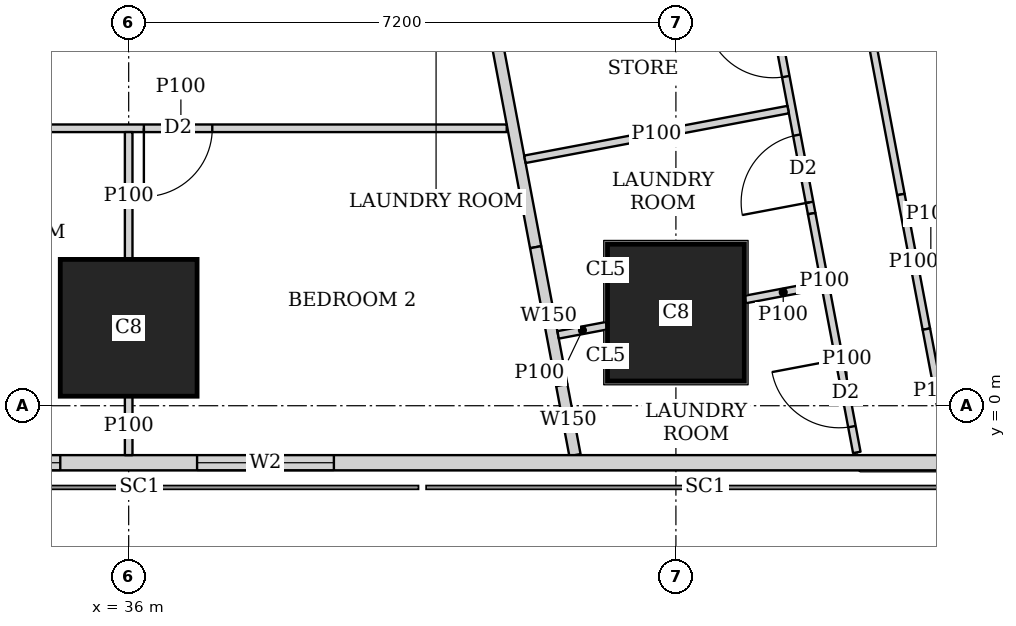
"""IFC4 building model, lengths in metres.
Left out: names, types, materials, properties, quantities, classifications, styles, units other than length and angle.
Written with IfcOpenShell. Run it as: python <this file> out.ifc"""

import sys

from ifc_helpers import new_model, si_unit, direction, frame, frame_2d, origin, origin_2d, place, context, subcontext, project, spatial, rectangle, extrude, element, fill, save


model = new_model("IFC4")
c1 = context("Model", 3, precision=1e-05, world=origin(), true_north=direction((0.0, 1.0)))
c2 = subcontext(c1, "Body", "Model", "MODEL_VIEW")
j1 = project(units=[si_unit("LENGTHUNIT", "METRE"), si_unit("PLANEANGLEUNIT", "RADIAN")], contexts=[c1])
p1 = place(None, origin())
s1 = spatial("IfcSite", under=j1, at=p1, CompositionType="ELEMENT")
p2 = place(p1, origin())
s2 = spatial("IfcBuilding", under=s1, at=p2, CompositionType="ELEMENT")
p3 = place(p2, frame((0.0, 0.0, 180.8)))
s3 = spatial("IfcBuildingStorey", under=s2, at=p3, CompositionType="ELEMENT", Elevation=180.8)
for number, where, z_axis, x_axis in (
    (1, (36.0, 1.025, 0.0), (0.0, 0.0, 1.0), (1.0, 0.0, 0.0)),
    (2, (43.2, 1.225, 0.0), (0.0, 0.0, 1.0), (1.0, 0.0, 0.0)),
):
    element("IfcColumn", number, at=place(p3, frame(where, z_axis=z_axis, x_axis=x_axis)), inside=s3, PredefinedType="COLUMN", context=c2, shape_type="SweptSolid", body=[
        extrude(rectangle(XDim=1.8, YDim=1.8, at=origin_2d()), origin(), (0.0, 0.0, 1.0), 3.75),
    ])
p4 = place(p3, frame((2.163, -0.75, 0.0), z_axis=(0.0, 0.0, 1.0), x_axis=(1.0, 0.0, 0.0)))
e3 = element("IfcWall", 3, at=p4, inside=s3, PredefinedType="SOLIDWALL", context=c2, shape_type="SweptSolid", body=[
    extrude(rectangle(XDim=45.628, YDim=0.2, at=frame_2d((22.814, 0.0))), origin(), (0.0, 0.0, 1.0), 3.5),
])
p5 = place(p4, frame((9.537, 0.0, 0.9)))
e4 = element("IfcOpeningElement", 4, at=p5, cuts=e3, PredefinedType="OPENING", context=c2, shape_type="SweptSolid", body=[
    extrude(rectangle(XDim=1.8, YDim=1.5, at=frame_2d((0.9, 0.75))), frame((0.0, 0.11, 0.0), z_axis=(0.0, -1.0, 0.0), x_axis=(1.0, 0.0, 0.0)), (0.0, 0.0, 1.0), 0.22),
])
p6 = place(p4, frame((13.137, 0.0, 0.9)))
e5 = element("IfcOpeningElement", 5, at=p6, cuts=e3, PredefinedType="OPENING", context=c2, shape_type="SweptSolid", body=[
    extrude(rectangle(XDim=1.8, YDim=1.5, at=frame_2d((0.9, 0.75))), frame((0.0, 0.11, 0.0), z_axis=(0.0, -1.0, 0.0), x_axis=(1.0, 0.0, 0.0)), (0.0, 0.0, 1.0), 0.22),
])
p7 = place(p4, frame((16.737, 0.0, 0.9)))
e6 = element("IfcOpeningElement", 6, at=p7, cuts=e3, PredefinedType="OPENING", context=c2, shape_type="SweptSolid", body=[
    extrude(rectangle(XDim=1.8, YDim=1.5, at=frame_2d((0.9, 0.75))), frame((0.0, 0.11, 0.0), z_axis=(0.0, -1.0, 0.0), x_axis=(1.0, 0.0, 0.0)), (0.0, 0.0, 1.0), 0.22),
])
p8 = place(p4, frame((20.337, 0.0, 0.9)))
e7 = element("IfcOpeningElement", 7, at=p8, cuts=e3, PredefinedType="OPENING", context=c2, shape_type="SweptSolid", body=[
    extrude(rectangle(XDim=1.8, YDim=1.5, at=frame_2d((0.9, 0.75))), frame((0.0, 0.11, 0.0), z_axis=(0.0, -1.0, 0.0), x_axis=(1.0, 0.0, 0.0)), (0.0, 0.0, 1.0), 0.22),
])
p9 = place(p4, frame((23.937, 0.0, 0.9)))
e8 = element("IfcOpeningElement", 8, at=p9, cuts=e3, PredefinedType="OPENING", context=c2, shape_type="SweptSolid", body=[
    extrude(rectangle(XDim=1.8, YDim=1.5, at=frame_2d((0.9, 0.75))), frame((0.0, 0.11, 0.0), z_axis=(0.0, -1.0, 0.0), x_axis=(1.0, 0.0, 0.0)), (0.0, 0.0, 1.0), 0.22),
])
p10 = place(p4, frame((27.537, 0.0, 0.9)))
e9 = element("IfcOpeningElement", 9, at=p10, cuts=e3, PredefinedType="OPENING", context=c2, shape_type="SweptSolid", body=[
    extrude(rectangle(XDim=1.8, YDim=1.5, at=frame_2d((0.9, 0.75))), frame((0.0, 0.11, 0.0), z_axis=(0.0, -1.0, 0.0), x_axis=(1.0, 0.0, 0.0)), (0.0, 0.0, 1.0), 0.22),
])
p11 = place(p4, frame((31.137, 0.0, 0.9)))
e10 = element("IfcOpeningElement", 10, at=p11, cuts=e3, PredefinedType="OPENING", context=c2, shape_type="SweptSolid", body=[
    extrude(rectangle(XDim=1.8, YDim=1.5, at=frame_2d((0.9, 0.75))), frame((0.0, 0.11, 0.0), z_axis=(0.0, -1.0, 0.0), x_axis=(1.0, 0.0, 0.0)), (0.0, 0.0, 1.0), 0.22),
])
p12 = place(p4, frame((34.737, 0.0, 0.9)))
e11 = element("IfcOpeningElement", 11, at=p12, cuts=e3, PredefinedType="OPENING", context=c2, shape_type="SweptSolid", body=[
    extrude(rectangle(XDim=1.8, YDim=1.5, at=frame_2d((0.9, 0.75))), frame((0.0, 0.11, 0.0), z_axis=(0.0, -1.0, 0.0), x_axis=(1.0, 0.0, 0.0)), (0.0, 0.0, 1.0), 0.22),
])
p13 = place(p3, frame((50.653, 2.703, 0.0), z_axis=(0.0, 0.0, 1.0), x_axis=(-0.185612026696, 0.982623109613, 0.0)))
e12 = element("IfcWall", 12, at=p13, inside=s3, PredefinedType="SOLIDWALL", context=c2, shape_type="SweptSolid", body=[
    extrude(rectangle(XDim=41.393, YDim=0.2, at=frame_2d((20.697, 0.0))), origin(), (0.0, 0.0, 1.0), 3.5),
])
p14 = place(p13, frame((1.633, 0.0, 0.9)))
e13 = element("IfcOpeningElement", 13, at=p14, cuts=e12, PredefinedType="OPENING", context=c2, shape_type="SweptSolid", body=[
    extrude(rectangle(XDim=1.8, YDim=1.5, at=frame_2d((0.9, 0.75))), frame((0.0, 0.11, 0.0), z_axis=(0.0, -1.0, 0.0), x_axis=(1.0, 0.0, 0.0)), (0.0, 0.0, 1.0), 0.22),
])
p15 = place(p13, frame((6.032, 0.0, 0.9)))
e14 = element("IfcOpeningElement", 14, at=p15, cuts=e12, PredefinedType="OPENING", context=c2, shape_type="SweptSolid", body=[
    extrude(rectangle(XDim=1.8, YDim=1.5, at=frame_2d((0.9, 0.75))), frame((0.0, 0.11, 0.0), z_axis=(0.0, -1.0, 0.0), x_axis=(1.0, 0.0, 0.0)), (0.0, 0.0, 1.0), 0.22),
])
p16 = place(p13, frame((9.848, 0.0, 0.9)))
e15 = element("IfcOpeningElement", 15, at=p16, cuts=e12, PredefinedType="OPENING", context=c2, shape_type="SweptSolid", body=[
    extrude(rectangle(XDim=1.8, YDim=1.5, at=frame_2d((0.9, 0.75))), frame((0.0, 0.11, 0.0), z_axis=(0.0, -1.0, 0.0), x_axis=(1.0, 0.0, 0.0)), (0.0, 0.0, 1.0), 0.22),
])
p17 = place(p13, frame((13.664, 0.0, 0.9)))
e16 = element("IfcOpeningElement", 16, at=p17, cuts=e12, PredefinedType="OPENING", context=c2, shape_type="SweptSolid", body=[
    extrude(rectangle(XDim=1.8, YDim=1.5, at=frame_2d((0.9, 0.75))), frame((0.0, 0.11, 0.0), z_axis=(0.0, -1.0, 0.0), x_axis=(1.0, 0.0, 0.0)), (0.0, 0.0, 1.0), 0.22),
])
p18 = place(p13, frame((17.481, 0.0, 0.9)))
e17 = element("IfcOpeningElement", 17, at=p18, cuts=e12, PredefinedType="OPENING", context=c2, shape_type="SweptSolid", body=[
    extrude(rectangle(XDim=1.8, YDim=1.5, at=frame_2d((0.9, 0.75))), frame((0.0, 0.11, 0.0), z_axis=(0.0, -1.0, 0.0), x_axis=(1.0, 0.0, 0.0)), (0.0, 0.0, 1.0), 0.22),
])
p19 = place(p13, frame((21.297, 0.0, 0.9)))
e18 = element("IfcOpeningElement", 18, at=p19, cuts=e12, PredefinedType="OPENING", context=c2, shape_type="SweptSolid", body=[
    extrude(rectangle(XDim=1.8, YDim=1.5, at=frame_2d((0.9, 0.75))), frame((0.0, 0.11, 0.0), z_axis=(0.0, -1.0, 0.0), x_axis=(1.0, 0.0, 0.0)), (0.0, 0.0, 1.0), 0.22),
])
p20 = place(p13, frame((25.113, 0.0, 0.9)))
e19 = element("IfcOpeningElement", 19, at=p20, cuts=e12, PredefinedType="OPENING", context=c2, shape_type="SweptSolid", body=[
    extrude(rectangle(XDim=1.8, YDim=1.5, at=frame_2d((0.9, 0.75))), frame((0.0, 0.11, 0.0), z_axis=(0.0, -1.0, 0.0), x_axis=(1.0, 0.0, 0.0)), (0.0, 0.0, 1.0), 0.22),
])
p21 = place(p13, frame((28.93, 0.0, 0.9)))
e20 = element("IfcOpeningElement", 20, at=p21, cuts=e12, PredefinedType="OPENING", context=c2, shape_type="SweptSolid", body=[
    extrude(rectangle(XDim=1.8, YDim=1.5, at=frame_2d((0.9, 0.75))), frame((0.0, 0.11, 0.0), z_axis=(0.0, -1.0, 0.0), x_axis=(1.0, 0.0, 0.0)), (0.0, 0.0, 1.0), 0.22),
])
p22 = place(p13, frame((32.746, 0.0, 0.9)))
e21 = element("IfcOpeningElement", 21, at=p22, cuts=e12, PredefinedType="OPENING", context=c2, shape_type="SweptSolid", body=[
    extrude(rectangle(XDim=1.8, YDim=1.5, at=frame_2d((0.9, 0.75))), frame((0.0, 0.11, 0.0), z_axis=(0.0, -1.0, 0.0), x_axis=(1.0, 0.0, 0.0)), (0.0, 0.0, 1.0), 0.22),
])
p23 = place(p13, frame((36.481, 0.0, 0.9)))
e22 = element("IfcOpeningElement", 22, at=p23, cuts=e12, PredefinedType="OPENING", context=c2, shape_type="SweptSolid", body=[
    extrude(rectangle(XDim=1.8, YDim=1.5, at=frame_2d((0.9, 0.75))), frame((0.0, 0.11, 0.0), z_axis=(0.0, -1.0, 0.0), x_axis=(1.0, 0.0, 0.0)), (0.0, 0.0, 1.0), 0.22),
])
p24 = place(p3, frame((33.623, 43.022, 0.0), z_axis=(0.0, 0.0, 1.0), x_axis=(0.185596841028, -0.98262597798, 0.0)))
e23 = element("IfcWall", 23, at=p24, inside=s3, PredefinedType="SOLIDWALL", context=c2, shape_type="SweptSolid", body=[
    extrude(rectangle(XDim=41.66, YDim=0.15, at=frame_2d((20.83, 0.0))), origin(), (0.0, 0.0, 1.0), 2.5),
])
p25 = place(p24, frame((8.034, 0.0, 0.0)))
e24 = element("IfcOpeningElement", 24, at=p25, cuts=e23, PredefinedType="OPENING", context=c2, shape_type="SweptSolid", body=[
    extrude(rectangle(XDim=1.0, YDim=2.1, at=frame_2d((0.5, 1.05))), frame((0.0, 0.085, 0.0), z_axis=(0.0, -1.0, 0.0), x_axis=(1.0, 0.0, 0.0)), (0.0, 0.0, 1.0), 0.17),
])
p26 = place(p24, frame((12.611, 0.0, 0.0)))
e25 = element("IfcOpeningElement", 25, at=p26, cuts=e23, PredefinedType="OPENING", context=c2, shape_type="SweptSolid", body=[
    extrude(rectangle(XDim=1.0, YDim=2.1, at=frame_2d((0.5, 1.05))), frame((0.0, 0.085, 0.0), z_axis=(0.0, -1.0, 0.0), x_axis=(1.0, 0.0, 0.0)), (0.0, 0.0, 1.0), 0.17),
])
p27 = place(p24, frame((20.242, 0.0, 0.0)))
e26 = element("IfcOpeningElement", 26, at=p27, cuts=e23, PredefinedType="OPENING", context=c2, shape_type="SweptSolid", body=[
    extrude(rectangle(XDim=1.0, YDim=2.1, at=frame_2d((0.5, 1.05))), frame((0.0, 0.085, 0.0), z_axis=(0.0, -1.0, 0.0), x_axis=(1.0, 0.0, 0.0)), (0.0, 0.0, 1.0), 0.17),
])
p28 = place(p24, frame((31.206, 0.0, 0.0)))
e27 = element("IfcOpeningElement", 27, at=p28, cuts=e23, PredefinedType="OPENING", context=c2, shape_type="SweptSolid", body=[
    extrude(rectangle(XDim=1.0, YDim=2.1, at=frame_2d((0.5, 1.05))), frame((0.0, 0.085, 0.0), z_axis=(0.0, -1.0, 0.0), x_axis=(1.0, 0.0, 0.0)), (0.0, 0.0, 1.0), 0.17),
])
p29 = place(p3, frame((41.355, 2.086, 0.0), z_axis=(0.0, 0.0, 1.0), x_axis=(0.185708872674, -0.982604811005, 0.0)))
e28 = element("IfcWall", 28, at=p29, inside=s3, PredefinedType="SOLIDWALL", context=c2, shape_type="SweptSolid", body=[
    extrude(rectangle(XDim=1.847, YDim=0.15, at=frame_2d((0.924, 0.0))), origin(), (0.0, 0.0, 1.0), 2.1),
])
p30 = place(p3, frame((41.698, 0.271, 0.0), z_axis=(0.0, 0.0, 1.0), x_axis=(0.185735329995, -0.982599810295, 0.0)))
e29 = element("IfcWall", 29, at=p30, inside=s3, PredefinedType="SOLIDWALL", context=c2, shape_type="SweptSolid", body=[
    extrude(rectangle(XDim=0.937, YDim=0.15, at=frame_2d((0.469, 0.0))), origin(), (0.0, 0.0, 1.0), 3.5),
])
p31 = place(p3, frame((40.974, 3.65, 0.0), z_axis=(0.0, 0.0, 1.0), x_axis=(-1.0, 0.0, 0.0)))
e30 = element("IfcWall", 30, at=p31, inside=s3, PredefinedType="PARTITIONING", context=c2, shape_type="SweptSolid", body=[
    extrude(rectangle(XDim=8.574, YDim=0.1, at=frame_2d((4.287, 0.0))), origin(), (0.0, 0.0, 1.0), 3.5),
])
p32 = place(p31, frame((7.474, 0.0, 0.0)))
e31 = element("IfcOpeningElement", 31, at=p32, cuts=e30, PredefinedType="OPENING", context=c2, shape_type="SweptSolid", body=[
    extrude(rectangle(XDim=0.9, YDim=2.1, at=frame_2d((0.45, 1.05))), frame((0.0, 0.06, 0.0), z_axis=(0.0, -1.0, 0.0), x_axis=(1.0, 0.0, 0.0)), (0.0, 0.0, 1.0), 0.12),
])
p33 = place(p31, frame((3.874, 0.0, 0.0)))
e32 = element("IfcOpeningElement", 32, at=p33, cuts=e30, PredefinedType="OPENING", context=c2, shape_type="SweptSolid", body=[
    extrude(rectangle(XDim=0.9, YDim=2.1, at=frame_2d((0.45, 1.05))), frame((0.0, 0.06, 0.0), z_axis=(0.0, -1.0, 0.0), x_axis=(1.0, 0.0, 0.0)), (0.0, 0.0, 1.0), 0.12),
])
p34 = place(p3, frame((36.0, -0.65, 0.0), z_axis=(0.0, 0.0, 1.0), x_axis=(0.0, 1.0, 0.0)))
e33 = element("IfcWall", 33, at=p34, inside=s3, PredefinedType="PARTITIONING", context=c2, shape_type="SweptSolid", body=[
    extrude(rectangle(XDim=0.774, YDim=0.1, at=frame_2d((0.387, 0.0))), origin(), (0.0, 0.0, 1.0), 3.5),
])
p35 = place(p3, frame((36.0, 1.926, 0.0), z_axis=(0.0, 0.0, 1.0), x_axis=(0.0, 1.0, 0.0)))
e34 = element("IfcWall", 34, at=p35, inside=s3, PredefinedType="PARTITIONING", context=c2, shape_type="SweptSolid", body=[
    extrude(rectangle(XDim=1.674, YDim=0.1, at=frame_2d((0.837, 0.0))), origin(), (0.0, 0.0, 1.0), 3.5),
])
p36 = place(p3, frame((44.727, 10.366, 0.0), z_axis=(0.0, 0.0, 1.0), x_axis=(0.185578957652, -0.982629355595, 0.0)))
e35 = element("IfcWall", 35, at=p36, inside=s3, PredefinedType="PARTITIONING", context=c2, shape_type="SweptSolid", body=[
    extrude(rectangle(XDim=7.721, YDim=0.1, at=frame_2d((3.86, 0.0))), origin(), (0.0, 0.0, 1.0), 3.5),
])
p37 = place(p36, frame((0.151, 0.0, 0.0)))
e36 = element("IfcOpeningElement", 36, at=p37, cuts=e35, PredefinedType="OPENING", context=c2, shape_type="SweptSolid", body=[
    extrude(rectangle(XDim=0.9, YDim=2.1, at=frame_2d((0.45, 1.05))), frame((0.0, 0.06, 0.0), z_axis=(0.0, -1.0, 0.0), x_axis=(1.0, 0.0, 0.0)), (0.0, 0.0, 1.0), 0.12),
])
p38 = place(p36, frame((3.806, 0.0, 0.0)))
e37 = element("IfcOpeningElement", 37, at=p38, cuts=e35, PredefinedType="OPENING", context=c2, shape_type="SweptSolid", body=[
    extrude(rectangle(XDim=0.9, YDim=2.1, at=frame_2d((0.45, 1.05))), frame((0.0, 0.06, 0.0), z_axis=(0.0, -1.0, 0.0), x_axis=(1.0, 0.0, 0.0)), (0.0, 0.0, 1.0), 0.12),
])
p39 = place(p3, frame((46.16, 2.779, 0.0), z_axis=(0.0, 0.0, 1.0), x_axis=(0.18597295662, -0.982554863306, 0.0)))
e38 = element("IfcWall", 38, at=p39, inside=s3, PredefinedType="PARTITIONING", context=c2, shape_type="SweptSolid", body=[
    extrude(rectangle(XDim=1.802, YDim=0.1, at=frame_2d((0.901, 0.0))), origin(), (0.0, 0.0, 1.0), 2.1),
])
p40 = place(p3, frame((46.495, 1.008, 0.0), z_axis=(0.0, 0.0, 1.0), x_axis=(0.185535059532, -0.982637645159, 0.0)))
e39 = element("IfcWall", 39, at=p40, inside=s3, PredefinedType="PARTITIONING", context=c2, shape_type="SweptSolid", body=[
    extrude(rectangle(XDim=1.644, YDim=0.1, at=frame_2d((0.822, 0.0))), origin(), (0.0, 0.0, 1.0), 3.5),
])
p41 = place(p3, frame((43.999, 7.755, 0.0), z_axis=(0.0, 0.0, 1.0), x_axis=(0.185565904578, -0.982631820703, 0.0)))
e40 = element("IfcWall", 40, at=p41, inside=s3, PredefinedType="PARTITIONING", context=c2, shape_type="SweptSolid", body=[
    extrude(rectangle(XDim=5.319, YDim=0.1, at=frame_2d((2.66, 0.0))), origin(), (0.0, 0.0, 1.0), 3.5),
])
p42 = place(p41, frame((1.0, 0.0, 0.0)))
e41 = element("IfcOpeningElement", 41, at=p42, cuts=e40, PredefinedType="OPENING", context=c2, shape_type="SweptSolid", body=[
    extrude(rectangle(XDim=0.9, YDim=2.1, at=frame_2d((0.45, 1.05))), frame((0.0, 0.06, 0.0), z_axis=(0.0, -1.0, 0.0), x_axis=(1.0, 0.0, 0.0)), (0.0, 0.0, 1.0), 0.12),
])
p43 = place(p41, frame((4.269, 0.0, 0.0)))
e42 = element("IfcOpeningElement", 42, at=p43, cuts=e40, PredefinedType="OPENING", context=c2, shape_type="SweptSolid", body=[
    extrude(rectangle(XDim=0.9, YDim=2.1, at=frame_2d((0.45, 1.05))), frame((0.0, 0.06, 0.0), z_axis=(0.0, -1.0, 0.0), x_axis=(1.0, 0.0, 0.0)), (0.0, 0.0, 1.0), 0.12),
])
p44 = place(p41, frame((2.585, 0.0, 0.0)))
e43 = element("IfcOpeningElement", 43, at=p44, cuts=e40, PredefinedType="OPENING", context=c2, shape_type="SweptSolid", body=[
    extrude(rectangle(XDim=0.9, YDim=2.1, at=frame_2d((0.45, 1.05))), frame((0.0, 0.06, 0.0), z_axis=(0.0, -1.0, 0.0), x_axis=(1.0, 0.0, 0.0)), (0.0, 0.0, 1.0), 0.12),
])
p45 = place(p3, frame((44.986, 2.528, 0.0), z_axis=(0.0, 0.0, 1.0), x_axis=(0.18584218627, -0.982579605835, 0.0)))
e44 = element("IfcWall", 44, at=p45, inside=s3, PredefinedType="PARTITIONING", context=c2, shape_type="SweptSolid", body=[
    extrude(rectangle(XDim=1.802, YDim=0.1, at=frame_2d((0.901, 0.0))), origin(), (0.0, 0.0, 1.0), 2.1),
])
p46 = place(p3, frame((45.321, 0.757, 0.0), z_axis=(0.0, 0.0, 1.0), x_axis=(0.185640562635, -0.982617718904, 0.0)))
e45 = element("IfcWall", 45, at=p46, inside=s3, PredefinedType="PARTITIONING", context=c2, shape_type="SweptSolid", body=[
    extrude(rectangle(XDim=1.395, YDim=0.1, at=frame_2d((0.698, 0.0))), origin(), (0.0, 0.0, 1.0), 3.5),
])
p47 = place(p46, frame((0.15, 0.0, 0.0)))
e46 = element("IfcOpeningElement", 46, at=p47, cuts=e45, PredefinedType="OPENING", context=c2, shape_type="SweptSolid", body=[
    extrude(rectangle(XDim=0.9, YDim=2.1, at=frame_2d((0.45, 1.05))), frame((0.0, 0.06, 0.0), z_axis=(0.0, -1.0, 0.0), x_axis=(1.0, 0.0, 0.0)), (0.0, 0.0, 1.0), 0.12),
])
p48 = place(p3, frame((46.738, 2.006, 0.0), z_axis=(0.0, 0.0, 1.0), x_axis=(-0.982820466874, -0.184564161994, 0.0)))
e47 = element("IfcWall", 47, at=p48, inside=s3, PredefinedType="PARTITIONING", context=c2, shape_type="SweptSolid", body=[
    extrude(rectangle(XDim=0.374, YDim=0.1, at=frame_2d((0.187, 0.0))), origin(), (0.0, 0.0, 1.0), 2.1),
])
p49 = place(p3, frame((45.114, 1.587, 0.0), z_axis=(0.0, 0.0, 1.0), x_axis=(-0.982567886437, -0.185904138047, 0.0)))
e48 = element("IfcWall", 48, at=p49, inside=s3, PredefinedType="PARTITIONING", context=c2, shape_type="SweptSolid", body=[
    extrude(rectangle(XDim=1.022, YDim=0.1, at=frame_2d((0.511, 0.0))), origin(), (0.0, 0.0, 1.0), 2.1),
])
p50 = place(p3, frame((42.29, 1.053, 0.0), z_axis=(0.0, 0.0, 1.0), x_axis=(-0.982573945355, -0.185872111707, 0.0)))
e49 = element("IfcWall", 49, at=p50, inside=s3, PredefinedType="PARTITIONING", context=c2, shape_type="SweptSolid", body=[
    extrude(rectangle(XDim=0.652, YDim=0.1, at=frame_2d((0.326, 0.0))), origin(), (0.0, 0.0, 1.0), 2.1),
])
p51 = place(p3, frame((44.677, 3.896, 0.0), z_axis=(0.0, 0.0, 1.0), x_axis=(-0.982638553676, -0.185530247748, 0.0)))
e50 = element("IfcWall", 50, at=p51, inside=s3, PredefinedType="PARTITIONING", context=c2, shape_type="SweptSolid", body=[
    extrude(rectangle(XDim=3.525, YDim=0.1, at=frame_2d((1.763, 0.0))), origin(), (0.0, 0.0, 1.0), 3.5),
])
p52 = place(p11, origin())
e51 = element("IfcWindow", 51, at=p52, inside=s3, PartitioningType="SINGLE_PANEL", PredefinedType="WINDOW", context=c2, shape_type="SweptSolid", body=[
    extrude(rectangle(XDim=1.8, YDim=1.5, at=frame_2d((0.9, 0.75))), frame((0.0, 0.03, 0.0), z_axis=(0.0, -1.0, 0.0), x_axis=(1.0, 0.0, 0.0)), (0.0, 0.0, 1.0), 0.06),
])
fill(e10, e51)
p53 = place(p12, origin())
e52 = element("IfcWindow", 52, at=p53, inside=s3, PartitioningType="SINGLE_PANEL", PredefinedType="WINDOW", context=c2, shape_type="SweptSolid", body=[
    extrude(rectangle(XDim=1.8, YDim=1.5, at=frame_2d((0.9, 0.75))), frame((0.0, 0.03, 0.0), z_axis=(0.0, -1.0, 0.0), x_axis=(1.0, 0.0, 0.0)), (0.0, 0.0, 1.0), 0.06),
])
fill(e11, e52)
p54 = place(p33, origin())
e53 = element("IfcDoor", 53, at=p54, inside=s3, OperationType="SINGLE_SWING_RIGHT", PredefinedType="DOOR", context=c2, shape_type="SweptSolid", body=[
    extrude(rectangle(XDim=0.9, YDim=2.1, at=frame_2d((0.45, 1.05))), frame((0.0, 0.025, 0.0), z_axis=(0.0, -1.0, 0.0), x_axis=(1.0, 0.0, 0.0)), (0.0, 0.0, 1.0), 0.05),
])
fill(e32, e53)
p55 = place(p43, origin())
e54 = element("IfcDoor", 54, at=p55, inside=s3, OperationType="SINGLE_SWING_LEFT", PredefinedType="DOOR", context=c2, shape_type="SweptSolid", body=[
    extrude(rectangle(XDim=0.9, YDim=2.1, at=frame_2d((0.45, 1.05))), frame((0.0, 0.025, 0.0), z_axis=(0.0, -1.0, 0.0), x_axis=(1.0, 0.0, 0.0)), (0.0, 0.0, 1.0), 0.05),
])
fill(e42, e54)
p56 = place(p47, origin())
e55 = element("IfcDoor", 55, at=p56, inside=s3, OperationType="SINGLE_SWING_RIGHT", PredefinedType="DOOR", context=c2, shape_type="SweptSolid", body=[
    extrude(rectangle(XDim=0.9, YDim=2.1, at=frame_2d((0.45, 1.05))), frame((0.0, 0.025, 0.0), z_axis=(0.0, -1.0, 0.0), x_axis=(1.0, 0.0, 0.0)), (0.0, 0.0, 1.0), 0.05),
])
fill(e46, e55)
p57 = place(p44, origin())
e56 = element("IfcDoor", 56, at=p57, inside=s3, OperationType="SINGLE_SWING_RIGHT", PredefinedType="DOOR", context=c2, shape_type="SweptSolid", body=[
    extrude(rectangle(XDim=0.9, YDim=2.1, at=frame_2d((0.45, 1.05))), frame((0.0, 0.025, 0.0), z_axis=(0.0, -1.0, 0.0), x_axis=(1.0, 0.0, 0.0)), (0.0, 0.0, 1.0), 0.05),
])
fill(e43, e56)
save(model, sys.argv[1])
